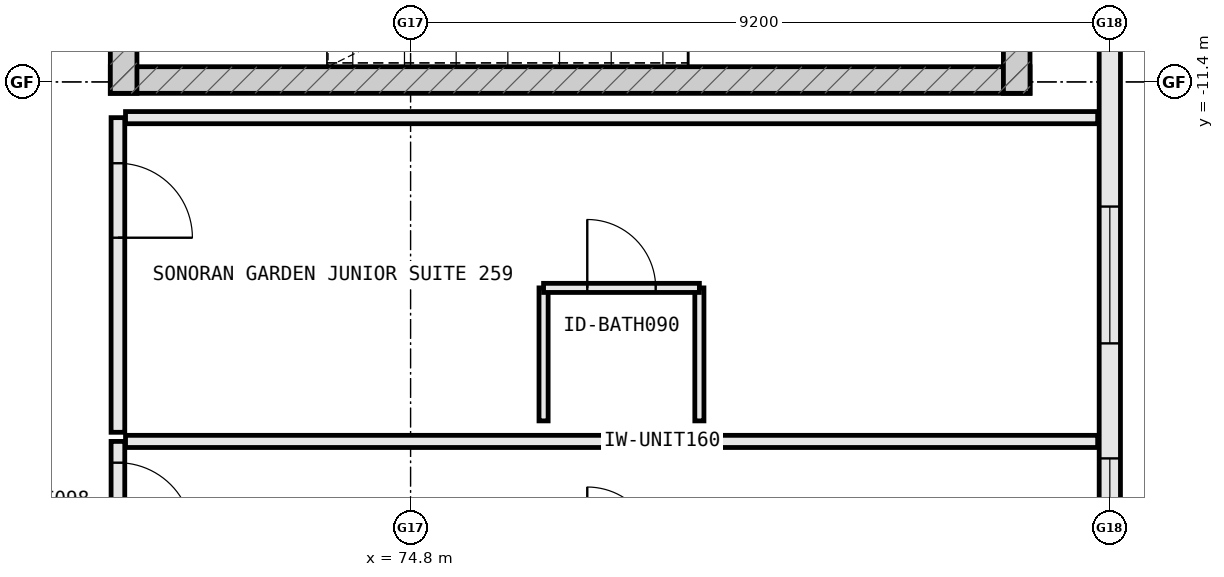
"""IFC4 building model, lengths in metres.
Left out: names, types, materials, properties, quantities, classifications, styles, units other than length and angle.
Written with IfcOpenShell. Run it as: python <this file> out.ifc"""

import sys

from ifc_helpers import new_model, si_unit, direction, frame, frame_2d, origin, place, context, subcontext, project, spatial, rectangle, extrude, element, fill, save


model = new_model("IFC4")
c1 = context("Model", 3, precision=1e-05, world=origin(), true_north=direction((0.0, 1.0)))
c2 = subcontext(c1, "Body", "Model", "MODEL_VIEW")
j1 = project(units=[si_unit("LENGTHUNIT", "METRE"), si_unit("PLANEANGLEUNIT", "RADIAN")], contexts=[c1])
p1 = place(None, origin())
s1 = spatial("IfcSite", under=j1, at=p1, CompositionType="ELEMENT")
p2 = place(p1, origin())
s2 = spatial("IfcBuilding", under=s1, at=p2, CompositionType="ELEMENT")
p3 = place(p2, frame((0.0, 0.0, 39.0)))
s3 = spatial("IfcBuildingStorey", under=s2, at=p3, CompositionType="ELEMENT", Elevation=39.0)
p4 = place(p3, frame((84.0, -18.377, 0.0), z_axis=(0.0, 0.0, 1.0), x_axis=(0.0, 1.0, 0.0)))
e1 = element("IfcWall", 1, at=p4, inside=s3, PredefinedType="STANDARD", context=c2, shape_type="SweptSolid", body=[
    extrude(rectangle(XDim=9.154, YDim=0.28, at=frame_2d((4.577, 0.0))), origin(), (0.0, 0.0, 1.0), 2.98),
])
p5 = place(p4, frame((0.223, 0.0, 0.85)))
e2 = element("IfcOpeningElement", 2, at=p5, cuts=e1, PredefinedType="OPENING", context=c2, shape_type="SweptSolid", body=[
    extrude(rectangle(XDim=1.8, YDim=1.85, at=frame_2d((0.9, 0.925))), frame((0.0, 0.152, 0.0), z_axis=(0.0, -1.0, 0.0), x_axis=(1.0, 0.0, 0.0)), (0.0, 0.0, 1.0), 0.304),
])
p6 = place(p4, frame((3.537, 0.0, 0.85)))
e3 = element("IfcOpeningElement", 3, at=p6, cuts=e1, PredefinedType="OPENING", context=c2, shape_type="SweptSolid", body=[
    extrude(rectangle(XDim=1.8, YDim=1.85, at=frame_2d((0.9, 0.925))), frame((0.0, 0.152, 0.0), z_axis=(0.0, -1.0, 0.0), x_axis=(1.0, 0.0, 0.0)), (0.0, 0.0, 1.0), 0.304),
])
p7 = place(p3, frame((70.85, -11.375, 0.0), z_axis=(0.0, 0.0, 1.0), x_axis=(1.0, 0.0, 0.0)))
e4 = element("IfcWall", 4, at=p7, inside=s3, PredefinedType="SHEAR", context=c2, shape_type="SweptSolid", body=[
    extrude(rectangle(XDim=12.1, YDim=0.35, at=frame_2d((6.05, 0.0))), origin(), (0.0, 0.0, 1.0), 3.8),
])
p8 = place(p3, frame((82.775, -11.55, 0.0), z_axis=(0.0, 0.0, 1.0), x_axis=(0.0, 1.0, 0.0)))
e5 = element("IfcWall", 5, at=p8, inside=s3, PredefinedType="SHEAR", context=c2, shape_type="SweptSolid", body=[
    extrude(rectangle(XDim=5.1, YDim=0.35, at=frame_2d((2.55, 0.0))), origin(), (0.0, 0.0, 1.0), 3.8),
])
p9 = place(p3, frame((71.025, -6.45, 0.0), z_axis=(0.0, 0.0, 1.0), x_axis=(0.0, -1.0, 0.0)))
e6 = element("IfcWall", 6, at=p9, inside=s3, PredefinedType="SHEAR", context=c2, shape_type="SweptSolid", body=[
    extrude(rectangle(XDim=5.1, YDim=0.35, at=frame_2d((2.55, 0.0))), origin(), (0.0, 0.0, 1.0), 3.8),
])
p10 = place(p9, frame((2.0, 0.0, 0.0)))
e7 = element("IfcOpeningElement", 7, at=p10, cuts=e6, PredefinedType="OPENING", context=c2, shape_type="SweptSolid", body=[
    extrude(rectangle(XDim=1.1, YDim=2.2, at=frame_2d((0.55, 1.1))), frame((0.0, 0.187, 0.0), z_axis=(0.0, -1.0, 0.0), x_axis=(1.0, 0.0, 0.0)), (0.0, 0.0, 1.0), 0.374),
])
p11 = place(p3, frame((70.95, -16.13, 0.0), z_axis=(0.0, 0.0, 1.0), x_axis=(0.0, -1.0, 0.0)))
e8 = element("IfcWall", 8, at=p11, inside=s3, PredefinedType="PARTITIONING", context=c2, shape_type="SweptSolid", body=[
    extrude(rectangle(XDim=3.4, YDim=0.18, at=frame_2d((1.7, 0.0))), origin(), (0.0, 0.0, 1.0), 3.565),
])
p12 = place(p11, frame((0.28, 0.0, 0.0)))
e9 = element("IfcOpeningElement", 9, at=p12, cuts=e8, PredefinedType="OPENING", context=c2, shape_type="SweptSolid", body=[
    extrude(rectangle(XDim=0.98, YDim=2.18, at=frame_2d((0.49, 1.09))), frame((0.0, 0.102, 0.0), z_axis=(0.0, -1.0, 0.0), x_axis=(1.0, 0.0, 0.0)), (0.0, 0.0, 1.0), 0.204),
])
p13 = place(p3, frame((71.05, -16.13, 0.0), z_axis=(0.0, 0.0, 1.0), x_axis=(1.0, 0.0, 0.0)))
e10 = element("IfcWall", 10, at=p13, inside=s3, PredefinedType="PARTITIONING", context=c2, shape_type="SweptSolid", body=[
    extrude(rectangle(XDim=12.79, YDim=0.16, at=frame_2d((6.395, 0.0))), origin(), (0.0, 0.0, 1.0), 3.565),
])
p14 = place(p3, frame((70.95, -11.87, 0.0), z_axis=(0.0, 0.0, 1.0), x_axis=(0.0, -1.0, 0.0)))
e11 = element("IfcWall", 11, at=p14, inside=s3, PredefinedType="PARTITIONING", context=c2, shape_type="SweptSolid", body=[
    extrude(rectangle(XDim=4.14, YDim=0.18, at=frame_2d((2.07, 0.0))), origin(), (0.0, 0.0, 1.0), 3.565),
])
p15 = place(p14, frame((0.6, 0.0, 0.0)))
e12 = element("IfcOpeningElement", 12, at=p15, cuts=e11, PredefinedType="OPENING", context=c2, shape_type="SweptSolid", body=[
    extrude(rectangle(XDim=0.98, YDim=2.18, at=frame_2d((0.49, 1.09))), frame((0.0, 0.102, 0.0), z_axis=(0.0, -1.0, 0.0), x_axis=(1.0, 0.0, 0.0)), (0.0, 0.0, 1.0), 0.204),
])
p16 = place(p3, frame((71.05, -11.87, 0.0), z_axis=(0.0, 0.0, 1.0), x_axis=(1.0, 0.0, 0.0)))
e13 = element("IfcWall", 13, at=p16, inside=s3, PredefinedType="PARTITIONING", context=c2, shape_type="SweptSolid", body=[
    extrude(rectangle(XDim=12.79, YDim=0.16, at=frame_2d((6.395, 0.0))), origin(), (0.0, 0.0, 1.0), 3.565),
])
for number, where, z_axis, x_axis in (
    (14, (76.55, -15.86, 0.0), (0.0, 0.0, 1.0), (0.0, 1.0, 0.0)),
    (15, (78.6, -15.86, 0.0), (0.0, 0.0, 1.0), (0.0, 1.0, 0.0)),
):
    element("IfcWall", number, at=place(p3, frame(where, z_axis=z_axis, x_axis=x_axis)), inside=s3, PredefinedType="PARTITIONING", context=c2, shape_type="SweptSolid", body=[
        extrude(rectangle(XDim=1.75, YDim=0.12, at=frame_2d((0.875, 0.0))), origin(), (0.0, 0.0, 1.0), 3.565),
    ])
p17 = place(p3, frame((76.55, -14.11, 0.0), z_axis=(0.0, 0.0, 1.0), x_axis=(1.0, 0.0, 0.0)))
e16 = element("IfcWall", 16, at=p17, inside=s3, PredefinedType="PARTITIONING", context=c2, shape_type="SweptSolid", body=[
    extrude(rectangle(XDim=2.05, YDim=0.12, at=frame_2d((1.025, 0.0))), origin(), (0.0, 0.0, 1.0), 3.565),
])
p18 = place(p17, frame((0.575, 0.0, 0.0)))
e17 = element("IfcOpeningElement", 17, at=p18, cuts=e16, PredefinedType="OPENING", context=c2, shape_type="SweptSolid", body=[
    extrude(rectangle(XDim=0.9, YDim=2.15, at=frame_2d((0.45, 1.075))), frame((0.0, 0.072, 0.0), z_axis=(0.0, -1.0, 0.0), x_axis=(1.0, 0.0, 0.0)), (0.0, 0.0, 1.0), 0.144),
])
p19 = place(p5, origin())
e18 = element("IfcWindow", 18, at=p19, inside=s3, PartitioningType="SINGLE_PANEL", PredefinedType="WINDOW", context=c2, shape_type="SweptSolid", body=[
    extrude(rectangle(XDim=1.8, YDim=1.85, at=frame_2d((0.9, 0.925))), frame((0.0, 0.03, 0.0), z_axis=(0.0, -1.0, 0.0), x_axis=(1.0, 0.0, 0.0)), (0.0, 0.0, 1.0), 0.06),
])
fill(e2, e18)
p20 = place(p6, origin())
e19 = element("IfcWindow", 19, at=p20, inside=s3, PartitioningType="SINGLE_PANEL", PredefinedType="WINDOW", context=c2, shape_type="SweptSolid", body=[
    extrude(rectangle(XDim=1.8, YDim=1.85, at=frame_2d((0.9, 0.925))), frame((0.0, 0.03, 0.0), z_axis=(0.0, -1.0, 0.0), x_axis=(1.0, 0.0, 0.0)), (0.0, 0.0, 1.0), 0.06),
])
fill(e3, e19)
p21 = place(p12, origin())
e20 = element("IfcDoor", 20, at=p21, inside=s3, OperationType="SINGLE_SWING_RIGHT", PredefinedType="DOOR", context=c2, shape_type="SweptSolid", body=[
    extrude(rectangle(XDim=0.98, YDim=2.18, at=frame_2d((0.49, 1.09))), frame((0.0, 0.025, 0.0), z_axis=(0.0, -1.0, 0.0), x_axis=(1.0, 0.0, 0.0)), (0.0, 0.0, 1.0), 0.05),
])
fill(e9, e20)
p22 = place(p15, origin())
e21 = element("IfcDoor", 21, at=p22, inside=s3, OperationType="SINGLE_SWING_RIGHT", PredefinedType="DOOR", context=c2, shape_type="SweptSolid", body=[
    extrude(rectangle(XDim=0.98, YDim=2.18, at=frame_2d((0.49, 1.09))), frame((0.0, 0.025, 0.0), z_axis=(0.0, -1.0, 0.0), x_axis=(1.0, 0.0, 0.0)), (0.0, 0.0, 1.0), 0.05),
])
fill(e12, e21)
p23 = place(p18, origin())
e22 = element("IfcDoor", 22, at=p23, inside=s3, OperationType="SINGLE_SWING_LEFT", PredefinedType="DOOR", context=c2, shape_type="SweptSolid", body=[
    extrude(rectangle(XDim=0.9, YDim=2.15, at=frame_2d((0.45, 1.075))), frame((0.0, 0.025, 0.0), z_axis=(0.0, -1.0, 0.0), x_axis=(1.0, 0.0, 0.0)), (0.0, 0.0, 1.0), 0.05),
])
fill(e17, e22)
save(model, sys.argv[1])
